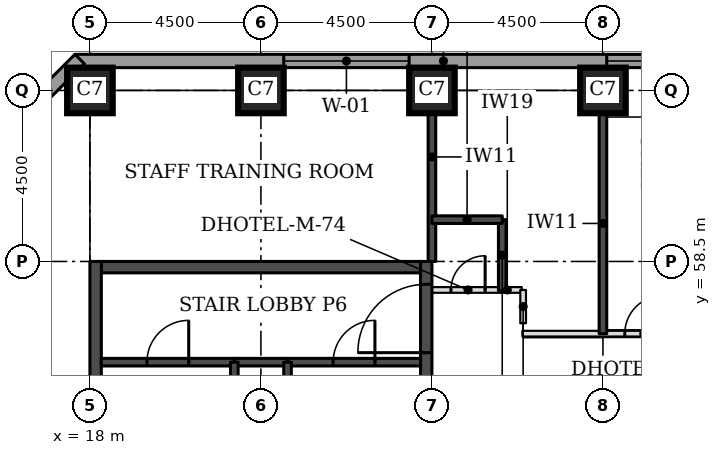
"""IFC4 building model, lengths in metres.
Left out: names, types, materials, properties, quantities, classifications, styles, units other than length and angle.
Written with IfcOpenShell. Run it as: python <this file> out.ifc"""

import sys

from ifc_helpers import new_model, si_unit, direction, frame, frame_2d, origin, origin_2d, place, context, subcontext, project, spatial, rectangle, extrude, element, fill, save


model = new_model("IFC4")
c1 = context("Model", 3, precision=1e-05, world=origin(), true_north=direction((0.0, 1.0)))
c2 = subcontext(c1, "Body", "Model", "MODEL_VIEW")
j1 = project(units=[si_unit("LENGTHUNIT", "METRE"), si_unit("PLANEANGLEUNIT", "RADIAN")], contexts=[c1])
p1 = place(None, origin())
s1 = spatial("IfcSite", under=j1, at=p1, CompositionType="ELEMENT")
p2 = place(p1, origin())
s2 = spatial("IfcBuilding", under=s1, at=p2, CompositionType="ELEMENT")
p3 = place(p2, frame((0.0, 0.0, 23.1)))
s3 = spatial("IfcBuildingStorey", under=s2, at=p3, CompositionType="ELEMENT", Elevation=23.1)
for number, where, z_axis, x_axis in (
    (1, (18.0, 63.0, 0.0), (0.0, 0.0, 1.0), (1.0, 0.0, 0.0)),
    (2, (22.5, 63.0, 0.0), (0.0, 0.0, 1.0), (1.0, 0.0, 0.0)),
    (3, (27.0, 63.0, 0.0), (0.0, 0.0, 1.0), (1.0, 0.0, 0.0)),
    (4, (31.5, 63.0, 0.0), (0.0, 0.0, 1.0), (1.0, 0.0, 0.0)),
):
    element("IfcColumn", number, at=place(p3, frame(where, z_axis=z_axis, x_axis=x_axis)), inside=s3, PredefinedType="COLUMN", context=c2, shape_type="SweptSolid", body=[
        extrude(rectangle(XDim=1.2, YDim=1.2, at=origin_2d()), origin(), (0.0, 0.0, 1.0), 3.3),
    ])
p4 = place(p3, frame((18.3, 58.35, 0.0), z_axis=(0.0, 0.0, 1.0), x_axis=(1.0, 0.0, 0.0)))
e5 = element("IfcWall", 5, at=p4, inside=s3, PredefinedType="SHEAR", context=c2, shape_type="SweptSolid", body=[
    extrude(rectangle(XDim=8.4, YDim=0.3, at=frame_2d((4.2, 0.0))), origin(), (0.0, 0.0, 1.0), 3.3),
])
p5 = place(p3, frame((18.15, 49.5, 0.0), z_axis=(0.0, 0.0, 1.0), x_axis=(0.0, 1.0, 0.0)))
e6 = element("IfcWall", 6, at=p5, inside=s3, PredefinedType="SHEAR", context=c2, shape_type="SweptSolid", body=[
    extrude(rectangle(XDim=9.0, YDim=0.3, at=frame_2d((4.5, 0.0))), origin(), (0.0, 0.0, 1.0), 3.3),
])
p6 = place(p3, frame((26.85, 49.5, 0.0), z_axis=(0.0, 0.0, 1.0), x_axis=(0.0, 1.0, 0.0)))
e7 = element("IfcWall", 7, at=p6, inside=s3, PredefinedType="SHEAR", context=c2, shape_type="SweptSolid", body=[
    extrude(rectangle(XDim=9.0, YDim=0.3, at=frame_2d((4.5, 0.0))), origin(), (0.0, 0.0, 1.0), 3.3),
])
p7 = place(p6, frame((6.6, 0.0, 0.0)))
e8 = element("IfcOpeningElement", 8, at=p7, cuts=e7, PredefinedType="OPENING", context=c2, shape_type="SweptSolid", body=[
    extrude(rectangle(XDim=1.8, YDim=2.1, at=frame_2d((0.9, 1.05))), frame((0.0, 0.16, 0.0), z_axis=(0.0, -1.0, 0.0), x_axis=(1.0, 0.0, 0.0)), (0.0, 0.0, 1.0), 0.32),
])
p8 = place(p3, frame((35.4, 63.775, 0.0), z_axis=(0.0, 0.0, 1.0), x_axis=(-1.0, 0.0, 0.0)))
e9 = element("IfcWall", 9, at=p8, inside=s3, PredefinedType="STANDARD", context=c2, shape_type="SweptSolid", body=[
    extrude(rectangle(XDim=17.793, YDim=0.35, at=frame_2d((8.897, 0.0))), origin(), (0.0, 0.0, 1.0), 3.055),
])
p9 = place(p8, frame((0.5, 0.0, 0.8)))
e10 = element("IfcOpeningElement", 10, at=p9, cuts=e9, PredefinedType="OPENING", context=c2, shape_type="SweptSolid", body=[
    extrude(rectangle(XDim=3.3, YDim=1.5, at=frame_2d((1.65, 0.75))), frame((0.0, 0.185, 0.0), z_axis=(0.0, -1.0, 0.0), x_axis=(1.0, 0.0, 0.0)), (0.0, 0.0, 1.0), 0.37),
])
p10 = place(p8, frame((9.0, 0.0, 0.8)))
e11 = element("IfcOpeningElement", 11, at=p10, cuts=e9, PredefinedType="OPENING", context=c2, shape_type="SweptSolid", body=[
    extrude(rectangle(XDim=3.3, YDim=1.5, at=frame_2d((1.65, 0.75))), frame((0.0, 0.185, 0.0), z_axis=(0.0, -1.0, 0.0), x_axis=(1.0, 0.0, 0.0)), (0.0, 0.0, 1.0), 0.37),
])
p11 = place(p3, frame((17.73, 63.826, 0.0), z_axis=(0.0, 0.0, 1.0), x_axis=(-0.707106781187, -0.707106781187, 0.0)))
e12 = element("IfcWall", 12, at=p11, inside=s3, PredefinedType="STANDARD", context=c2, shape_type="SweptSolid", body=[
    extrude(rectangle(XDim=7.151, YDim=0.35, at=frame_2d((3.576, 0.0))), origin(), (0.0, 0.0, 1.0), 3.055),
])
p12 = place(p11, frame((1.926, 0.0, 0.8)))
e13 = element("IfcOpeningElement", 13, at=p12, cuts=e12, PredefinedType="OPENING", context=c2, shape_type="SweptSolid", body=[
    extrude(rectangle(XDim=3.3, YDim=1.5, at=frame_2d((1.65, 0.75))), frame((0.0, 0.185, 0.0), z_axis=(0.0, -1.0, 0.0), x_axis=(1.0, 0.0, 0.0)), (0.0, 0.0, 1.0), 0.37),
])
p13 = place(p3, frame((29.38, 56.6, 0.0), z_axis=(0.0, 0.0, 1.0), x_axis=(1.0, 0.0, 0.0)))
e14 = element("IfcWall", 14, at=p13, inside=s3, PredefinedType="PARTITIONING", context=c2, shape_type="SweptSolid", body=[
    extrude(rectangle(XDim=13.62, YDim=0.15, at=frame_2d((6.81, 0.0))), origin(), (0.0, 0.0, 1.0), 3.08),
])
p14 = place(p13, frame((2.695, 0.0, 0.0)))
e15 = element("IfcOpeningElement", 15, at=p14, cuts=e14, PredefinedType="OPENING", context=c2, shape_type="SweptSolid", body=[
    extrude(rectangle(XDim=1.0, YDim=2.1, at=frame_2d((0.5, 1.05))), frame((0.0, 0.085, 0.0), z_axis=(0.0, -1.0, 0.0), x_axis=(1.0, 0.0, 0.0)), (0.0, 0.0, 1.0), 0.17),
])
p15 = place(p13, frame((9.67, 0.0, 0.0)))
e16 = element("IfcOpeningElement", 16, at=p15, cuts=e14, PredefinedType="OPENING", context=c2, shape_type="SweptSolid", body=[
    extrude(rectangle(XDim=0.9, YDim=2.1, at=frame_2d((0.45, 1.05))), frame((0.0, 0.085, 0.0), z_axis=(0.0, -1.0, 0.0), x_axis=(1.0, 0.0, 0.0)), (0.0, 0.0, 1.0), 0.17),
])
p16 = place(p3, frame((27.0, 58.5, 0.0), z_axis=(0.0, 0.0, 1.0), x_axis=(0.0, 1.0, 0.0)))
e17 = element("IfcWall", 17, at=p16, inside=s3, PredefinedType="SOLIDWALL", context=c2, shape_type="SweptSolid", body=[
    extrude(rectangle(XDim=3.9, YDim=0.2, at=frame_2d((1.95, 0.0))), origin(), (0.0, 0.0, 1.0), 3.08),
])
p17 = place(p3, frame((28.85, 57.73, 0.0), z_axis=(0.0, 0.0, 1.0), x_axis=(0.0, 1.0, 0.0)))
e18 = element("IfcWall", 18, at=p17, inside=s3, PredefinedType="SOLIDWALL", context=c2, shape_type="SweptSolid", body=[
    extrude(rectangle(XDim=1.87, YDim=0.2, at=frame_2d((0.935, 0.0))), origin(), (0.0, 0.0, 1.0), 3.08),
])
p18 = place(p3, frame((31.5, 56.6, 0.0), z_axis=(0.0, 0.0, 1.0), x_axis=(0.0, 1.0, 0.0)))
e19 = element("IfcWall", 19, at=p18, inside=s3, PredefinedType="SOLIDWALL", context=c2, shape_type="SweptSolid", body=[
    extrude(rectangle(XDim=5.8, YDim=0.2, at=frame_2d((2.9, 0.0))), origin(), (0.0, 0.0, 1.0), 3.08),
])
p19 = place(p3, frame((27.0, 59.6, 0.0), z_axis=(0.0, 0.0, 1.0), x_axis=(1.0, 0.0, 0.0)))
e20 = element("IfcWall", 20, at=p19, inside=s3, PredefinedType="SOLIDWALL", context=c2, shape_type="SweptSolid", body=[
    extrude(rectangle(XDim=1.85, YDim=0.2, at=frame_2d((0.925, 0.0))), origin(), (0.0, 0.0, 1.0), 3.08),
])
p20 = place(p3, frame((27.0, 57.75, 0.0), z_axis=(0.0, 0.0, 1.0), x_axis=(1.0, 0.0, 0.0)))
e21 = element("IfcWall", 21, at=p20, inside=s3, PredefinedType="PARTITIONING", context=c2, shape_type="SweptSolid", body=[
    extrude(rectangle(XDim=2.365, YDim=0.15, at=frame_2d((1.183, 0.0))), origin(), (0.0, 0.0, 1.0), 3.08),
])
p21 = place(p20, frame((0.5, 0.0, 0.0)))
e22 = element("IfcOpeningElement", 22, at=p21, cuts=e21, PredefinedType="OPENING", context=c2, shape_type="SweptSolid", body=[
    extrude(rectangle(XDim=0.9, YDim=2.1, at=frame_2d((0.45, 1.05))), frame((0.0, 0.085, 0.0), z_axis=(0.0, -1.0, 0.0), x_axis=(1.0, 0.0, 0.0)), (0.0, 0.0, 1.0), 0.17),
])
p22 = place(p3, frame((29.4, 57.75, 0.0), z_axis=(0.0, 0.0, 1.0), x_axis=(0.0, -1.0, 0.0)))
e23 = element("IfcWall", 23, at=p22, inside=s3, PredefinedType="PARTITIONING", context=c2, shape_type="SweptSolid", body=[
    extrude(rectangle(XDim=0.875, YDim=0.15, at=frame_2d((0.438, 0.0))), origin(), (0.0, 0.0, 1.0), 3.08),
])
p23 = place(p3, frame((21.8, 55.85, 0.0), z_axis=(0.0, 0.0, 1.0), x_axis=(1.0, 0.0, 0.0)))
e24 = element("IfcWall", 24, at=p23, inside=s3, PredefinedType="SOLIDWALL", context=c2, shape_type="SweptSolid", body=[
    extrude(rectangle(XDim=1.4, YDim=0.2, at=frame_2d((0.7, 0.0))), origin(), (0.0, 0.0, 1.0), 3.08),
])
p24 = place(p3, frame((18.3, 55.85, 0.0), z_axis=(0.0, 0.0, 1.0), x_axis=(1.0, 0.0, 0.0)))
e25 = element("IfcWall", 25, at=p24, inside=s3, PredefinedType="SOLIDWALL", context=c2, shape_type="SweptSolid", body=[
    extrude(rectangle(XDim=3.5, YDim=0.2, at=frame_2d((1.75, 0.0))), origin(), (0.0, 0.0, 1.0), 3.08),
])
p25 = place(p24, frame((1.2, 0.0, 0.0)))
e26 = element("IfcOpeningElement", 26, at=p25, cuts=e25, PredefinedType="OPENING", context=c2, shape_type="SweptSolid", body=[
    extrude(rectangle(XDim=1.1, YDim=2.1, at=frame_2d((0.55, 1.05))), frame((0.0, 0.11, 0.0), z_axis=(0.0, -1.0, 0.0), x_axis=(1.0, 0.0, 0.0)), (0.0, 0.0, 1.0), 0.22),
])
p26 = place(p3, frame((23.2, 55.85, 0.0), z_axis=(0.0, 0.0, 1.0), x_axis=(1.0, 0.0, 0.0)))
e27 = element("IfcWall", 27, at=p26, inside=s3, PredefinedType="SOLIDWALL", context=c2, shape_type="SweptSolid", body=[
    extrude(rectangle(XDim=3.5, YDim=0.2, at=frame_2d((1.75, 0.0))), origin(), (0.0, 0.0, 1.0), 3.08),
])
p27 = place(p26, frame((1.2, 0.0, 0.0)))
e28 = element("IfcOpeningElement", 28, at=p27, cuts=e27, PredefinedType="OPENING", context=c2, shape_type="SweptSolid", body=[
    extrude(rectangle(XDim=1.1, YDim=2.1, at=frame_2d((0.55, 1.05))), frame((0.0, 0.11, 0.0), z_axis=(0.0, -1.0, 0.0), x_axis=(1.0, 0.0, 0.0)), (0.0, 0.0, 1.0), 0.22),
])
for number, where, z_axis, x_axis in (
    (29, (21.8, 49.8, 0.0), (0.0, 0.0, 1.0), (0.0, 1.0, 0.0)),
    (30, (23.2, 49.8, 0.0), (0.0, 0.0, 1.0), (0.0, 1.0, 0.0)),
):
    element("IfcWall", number, at=place(p3, frame(where, z_axis=z_axis, x_axis=x_axis)), inside=s3, PredefinedType="SOLIDWALL", context=c2, shape_type="SweptSolid", body=[
        extrude(rectangle(XDim=6.05, YDim=0.2, at=frame_2d((3.025, 0.0))), origin(), (0.0, 0.0, 1.0), 3.08),
    ])
p28 = place(p9, origin())
e31 = element("IfcWindow", 31, at=p28, inside=s3, PartitioningType="SINGLE_PANEL", PredefinedType="WINDOW", context=c2, shape_type="SweptSolid", body=[
    extrude(rectangle(XDim=3.3, YDim=1.5, at=frame_2d((1.65, 0.75))), frame((0.0, 0.085, 0.0), z_axis=(0.0, -1.0, 0.0), x_axis=(1.0, 0.0, 0.0)), (0.0, 0.0, 1.0), 0.06),
])
fill(e10, e31)
p29 = place(p10, origin())
e32 = element("IfcWindow", 32, at=p29, inside=s3, PartitioningType="SINGLE_PANEL", PredefinedType="WINDOW", context=c2, shape_type="SweptSolid", body=[
    extrude(rectangle(XDim=3.3, YDim=1.5, at=frame_2d((1.65, 0.75))), frame((0.0, 0.085, 0.0), z_axis=(0.0, -1.0, 0.0), x_axis=(1.0, 0.0, 0.0)), (0.0, 0.0, 1.0), 0.06),
])
fill(e11, e32)
p30 = place(p14, origin())
e33 = element("IfcDoor", 33, at=p30, inside=s3, OperationType="SINGLE_SWING_RIGHT", PredefinedType="DOOR", context=c2, shape_type="SweptSolid", body=[
    extrude(rectangle(XDim=1.0, YDim=2.1, at=frame_2d((0.5, 1.05))), frame((0.0, 0.025, 0.0), z_axis=(0.0, -1.0, 0.0), x_axis=(1.0, 0.0, 0.0)), (0.0, 0.0, 1.0), 0.05),
])
fill(e15, e33)
p31 = place(p21, origin())
e34 = element("IfcDoor", 34, at=p31, inside=s3, OperationType="SINGLE_SWING_RIGHT", PredefinedType="DOOR", context=c2, shape_type="SweptSolid", body=[
    extrude(rectangle(XDim=0.9, YDim=2.1, at=frame_2d((0.45, 1.05))), frame((0.0, 0.025, 0.0), z_axis=(0.0, -1.0, 0.0), x_axis=(1.0, 0.0, 0.0)), (0.0, 0.0, 1.0), 0.05),
])
fill(e22, e34)
p32 = place(p25, origin())
e35 = element("IfcDoor", 35, at=p32, inside=s3, OperationType="SINGLE_SWING_RIGHT", PredefinedType="DOOR", context=c2, shape_type="SweptSolid", body=[
    extrude(rectangle(XDim=1.1, YDim=2.1, at=frame_2d((0.55, 1.05))), frame((0.0, 0.025, 0.0), z_axis=(0.0, -1.0, 0.0), x_axis=(1.0, 0.0, 0.0)), (0.0, 0.0, 1.0), 0.05),
])
fill(e26, e35)
p33 = place(p27, origin())
e36 = element("IfcDoor", 36, at=p33, inside=s3, OperationType="SINGLE_SWING_RIGHT", PredefinedType="DOOR", context=c2, shape_type="SweptSolid", body=[
    extrude(rectangle(XDim=1.1, YDim=2.1, at=frame_2d((0.55, 1.05))), frame((0.0, 0.025, 0.0), z_axis=(0.0, -1.0, 0.0), x_axis=(1.0, 0.0, 0.0)), (0.0, 0.0, 1.0), 0.05),
])
fill(e28, e36)
p34 = place(p7, origin())
e37 = element("IfcDoor", 37, at=p34, inside=s3, OperationType="SINGLE_SWING_LEFT", PredefinedType="DOOR", context=c2, shape_type="SweptSolid", body=[
    extrude(rectangle(XDim=1.8, YDim=2.1, at=frame_2d((0.9, 1.05))), frame((0.0, 0.025, 0.0), z_axis=(0.0, -1.0, 0.0), x_axis=(1.0, 0.0, 0.0)), (0.0, 0.0, 1.0), 0.05),
])
fill(e8, e37)
save(model, sys.argv[1])
